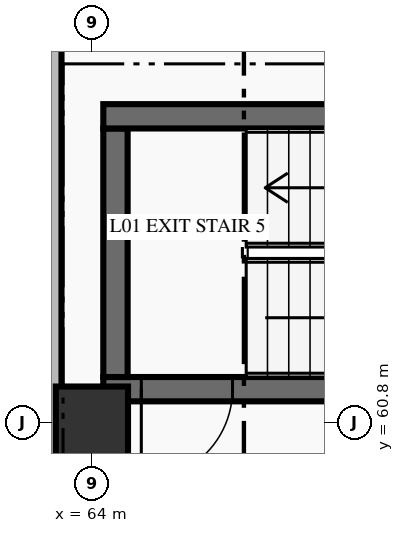
"""IFC4 building model, lengths in metres.
Left out: names, types, materials, properties, quantities, classifications, styles, units other than length and angle.
Written with IfcOpenShell. Run it as: python <this file> out.ifc"""

import sys

from ifc_helpers import new_model, si_unit, direction, frame, frame_2d, origin, origin_2d, place, context, subcontext, project, spatial, rectangle, extrude, element, fill, save


model = new_model("IFC4")
c1 = context("Model", 3, precision=1e-05, world=origin(), true_north=direction((0.0, 1.0)))
c2 = subcontext(c1, "Body", "Model", "MODEL_VIEW")
j1 = project(units=[si_unit("LENGTHUNIT", "METRE"), si_unit("PLANEANGLEUNIT", "RADIAN")], contexts=[c1])
p1 = place(None, origin())
s1 = spatial("IfcSite", under=j1, at=p1, CompositionType="ELEMENT")
p2 = place(p1, origin())
s2 = spatial("IfcBuilding", under=s1, at=p2, CompositionType="ELEMENT")
p3 = place(p2, origin())
s3 = spatial("IfcBuildingStorey", under=s2, at=p3, CompositionType="ELEMENT", Elevation=0.0)
p4 = place(p3, frame((64.0, 60.8, 0.0), z_axis=(0.0, 0.0, 1.0), x_axis=(1.0, 0.0, 0.0)))
e1 = element("IfcColumn", 1, at=p4, inside=s3, PredefinedType="COLUMN", context=c2, shape_type="SweptSolid", body=[
    extrude(rectangle(XDim=0.95, YDim=0.95, at=origin_2d()), origin(), (0.0, 0.0, 1.0), 5.4),
])
p5 = place(p3, frame((71.85, 61.24, 0.0), z_axis=(0.0, 0.0, 1.0), x_axis=(-1.0, 0.0, 0.0)))
e2 = element("IfcWall", 2, at=p5, inside=s3, PredefinedType="SHEAR", context=c2, shape_type="SweptSolid", body=[
    extrude(rectangle(XDim=7.7, YDim=0.32, at=frame_2d((3.85, 0.0))), origin(), (0.0, 0.0, 1.0), 5.4),
])
p6 = place(p5, frame((6.0, 0.0, 0.0)))
e3 = element("IfcOpeningElement", 3, at=p6, cuts=e2, PredefinedType="OPENING", context=c2, shape_type="SweptSolid", body=[
    extrude(rectangle(XDim=1.2, YDim=2.2, at=frame_2d((0.6, 1.1))), frame((0.0, 0.17, 0.0), z_axis=(0.0, -1.0, 0.0), x_axis=(1.0, 0.0, 0.0)), (0.0, 0.0, 1.0), 0.34),
])
p7 = place(p3, frame((64.31, 61.4, 0.0), z_axis=(0.0, 0.0, 1.0), x_axis=(0.0, 1.0, 0.0)))
e4 = element("IfcWall", 4, at=p7, inside=s3, PredefinedType="SHEAR", context=c2, shape_type="SweptSolid", body=[
    extrude(rectangle(XDim=3.27, YDim=0.32, at=frame_2d((1.635, 0.0))), origin(), (0.0, 0.0, 1.0), 5.4),
])
p8 = place(p3, frame((64.15, 64.83, 0.0), z_axis=(0.0, 0.0, 1.0), x_axis=(1.0, 0.0, 0.0)))
e5 = element("IfcWall", 5, at=p8, inside=s3, PredefinedType="SHEAR", context=c2, shape_type="SweptSolid", body=[
    extrude(rectangle(XDim=7.7, YDim=0.32, at=frame_2d((3.85, 0.0))), origin(), (0.0, 0.0, 1.0), 5.4),
])
p9 = place(p3, frame((63.5, 58.75, 0.0), z_axis=(0.0, 0.0, 1.0), x_axis=(0.0, 1.0, 0.0)))
e6 = element("IfcWall", 6, at=p9, inside=s3, PredefinedType="STANDARD", context=c2, shape_type="SweptSolid", body=[
    extrude(rectangle(XDim=9.65, YDim=0.2, at=frame_2d((4.825, 0.0))), origin(), (0.0, 0.0, 1.0), 5.16),
])
p10 = place(p9, frame((7.55, 0.0, 0.0)))
e7 = element("IfcOpeningElement", 7, at=p10, cuts=e6, PredefinedType="OPENING", context=c2, shape_type="SweptSolid", body=[
    extrude(rectangle(XDim=1.05, YDim=2.15, at=frame_2d((0.525, 1.075))), frame((0.0, 0.11, 0.0), z_axis=(0.0, -1.0, 0.0), x_axis=(1.0, 0.0, 0.0)), (0.0, 0.0, 1.0), 0.22),
])
p11 = place(p6, origin())
e8 = element("IfcDoor", 8, at=p11, inside=s3, OperationType="SINGLE_SWING_RIGHT", PredefinedType="DOOR", context=c2, shape_type="SweptSolid", body=[
    extrude(rectangle(XDim=1.2, YDim=2.2, at=frame_2d((0.6, 1.1))), frame((0.0, 0.025, 0.0), z_axis=(0.0, -1.0, 0.0), x_axis=(1.0, 0.0, 0.0)), (0.0, 0.0, 1.0), 0.05),
])
fill(e3, e8)
save(model, sys.argv[1])
